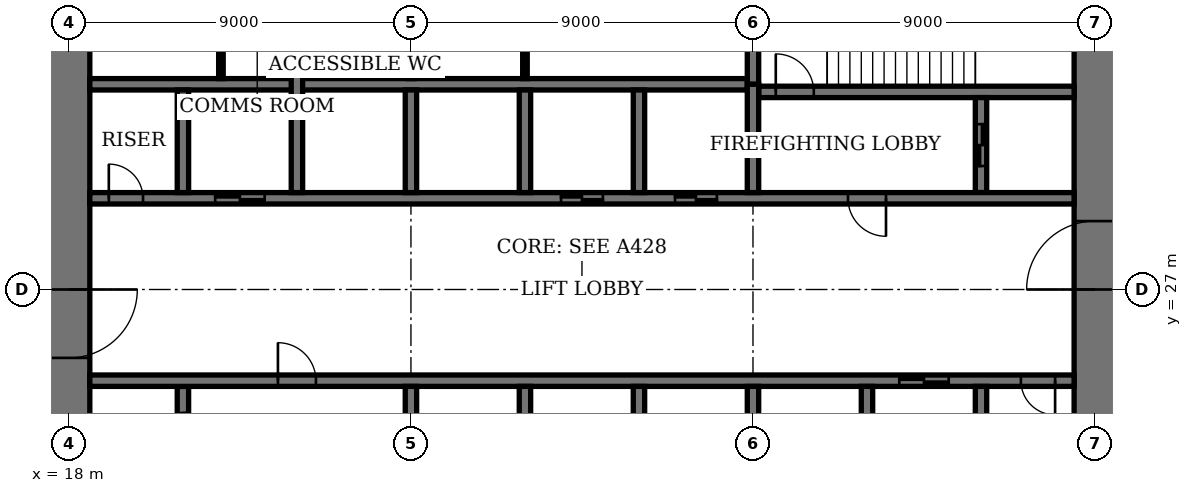
"""IFC4 building model, lengths in metres.
Left out: names, types, materials, properties, quantities, classifications, styles, units other than length and angle.
Written with IfcOpenShell. Run it as: python <this file> out.ifc"""

import sys

from ifc_helpers import new_model, si_unit, direction, frame, frame_2d, origin, place, context, subcontext, project, spatial, rectangle, extrude, element, fill, save


model = new_model("IFC4")
c1 = context("Model", 3, precision=1e-05, world=origin(), true_north=direction((0.0, 1.0)))
c2 = subcontext(c1, "Body", "Model", "MODEL_VIEW")
j1 = project(units=[si_unit("LENGTHUNIT", "METRE"), si_unit("PLANEANGLEUNIT", "RADIAN")], contexts=[c1])
p1 = place(None, origin())
s1 = spatial("IfcSite", under=j1, at=p1, CompositionType="ELEMENT")
p2 = place(p1, origin())
s2 = spatial("IfcBuilding", under=s1, at=p2, CompositionType="ELEMENT")
p3 = place(p2, frame((0.0, 0.0, 141.0)))
s3 = spatial("IfcBuildingStorey", under=s2, at=p3, CompositionType="ELEMENT", Elevation=141.0)
p4 = place(p3, frame((18.0, 35.45, 0.0), z_axis=(0.0, 0.0, 1.0), x_axis=(0.0, -1.0, 0.0)))
e1 = element("IfcWall", 1, at=p4, inside=s3, PredefinedType="SHEAR", context=c2, shape_type="SweptSolid", body=[
    extrude(rectangle(XDim=16.9, YDim=1.1, at=frame_2d((8.45, 0.0))), origin(), (0.0, 0.0, 1.0), 4.0),
])
p5 = place(p4, frame((8.45, 0.0, 0.0)))
e2 = element("IfcOpeningElement", 2, at=p5, cuts=e1, PredefinedType="OPENING", context=c2, shape_type="SweptSolid", body=[
    extrude(rectangle(XDim=1.8, YDim=2.4, at=frame_2d((0.9, 1.2))), frame((0.0, 0.56, 0.0), z_axis=(0.0, -1.0, 0.0), x_axis=(1.0, 0.0, 0.0)), (0.0, 0.0, 1.0), 1.12),
])
p6 = place(p3, frame((45.0, 18.55, 0.0), z_axis=(0.0, 0.0, 1.0), x_axis=(0.0, 1.0, 0.0)))
e3 = element("IfcWall", 3, at=p6, inside=s3, PredefinedType="SHEAR", context=c2, shape_type="SweptSolid", body=[
    extrude(rectangle(XDim=16.9, YDim=1.1, at=frame_2d((8.45, 0.0))), origin(), (0.0, 0.0, 1.0), 4.0),
])
p7 = place(p6, frame((8.45, 0.0, 0.0)))
e4 = element("IfcOpeningElement", 4, at=p7, cuts=e3, PredefinedType="OPENING", context=c2, shape_type="SweptSolid", body=[
    extrude(rectangle(XDim=1.8, YDim=2.4, at=frame_2d((0.9, 1.2))), frame((0.0, 0.56, 0.0), z_axis=(0.0, -1.0, 0.0), x_axis=(1.0, 0.0, 0.0)), (0.0, 0.0, 1.0), 1.12),
])
p8 = place(p3, frame((36.15, 32.2, 0.0), z_axis=(0.0, 0.0, 1.0), x_axis=(1.0, 0.0, 0.0)))
e5 = element("IfcWall", 5, at=p8, inside=s3, PredefinedType="SHEAR", context=c2, shape_type="SweptSolid", body=[
    extrude(rectangle(XDim=8.3, YDim=0.3, at=frame_2d((4.15, 0.0))), origin(), (0.0, 0.0, 1.0), 4.0),
])
p9 = place(p8, frame((0.45, 0.0, 0.0)))
e6 = element("IfcOpeningElement", 6, at=p9, cuts=e5, PredefinedType="OPENING", context=c2, shape_type="SweptSolid", body=[
    extrude(rectangle(XDim=1.0, YDim=2.4, at=frame_2d((0.5, 1.2))), frame((0.0, 0.16, 0.0), z_axis=(0.0, -1.0, 0.0), x_axis=(1.0, 0.0, 0.0)), (0.0, 0.0, 1.0), 0.32),
])
p10 = place(p3, frame((36.0, 32.4, 0.0), z_axis=(0.0, 0.0, 1.0), x_axis=(0.0, 1.0, 0.0)))
e7 = element("IfcWall", 7, at=p10, inside=s3, PredefinedType="SHEAR", context=c2, shape_type="SweptSolid", body=[
    extrude(rectangle(XDim=3.05, YDim=0.3, at=frame_2d((1.525, 0.0))), origin(), (0.0, 0.0, 1.0), 4.0),
])
p11 = place(p3, frame((21.0, 21.95, 0.0), z_axis=(0.0, 0.0, 1.0), x_axis=(0.0, 1.0, 0.0)))
e8 = element("IfcWall", 8, at=p11, inside=s3, PredefinedType="SHEAR", context=c2, shape_type="SweptSolid", body=[
    extrude(rectangle(XDim=2.5, YDim=0.3, at=frame_2d((1.25, 0.0))), origin(), (0.0, 0.0, 1.0), 4.0),
])
p12 = place(p11, frame((0.7, 0.0, 0.0)))
e9 = element("IfcOpeningElement", 9, at=p12, cuts=e8, PredefinedType="OPENING", context=c2, shape_type="SweptSolid", body=[
    extrude(rectangle(XDim=1.1, YDim=2.4, at=frame_2d((0.55, 1.2))), frame((0.0, 0.16, 0.0), z_axis=(0.0, -1.0, 0.0), x_axis=(1.0, 0.0, 0.0)), (0.0, 0.0, 1.0), 0.32),
])
p13 = place(p3, frame((42.0, 29.55, 0.0), z_axis=(0.0, 0.0, 1.0), x_axis=(0.0, 1.0, 0.0)))
e10 = element("IfcWall", 10, at=p13, inside=s3, PredefinedType="SHEAR", context=c2, shape_type="SweptSolid", body=[
    extrude(rectangle(XDim=2.5, YDim=0.3, at=frame_2d((1.25, 0.0))), origin(), (0.0, 0.0, 1.0), 4.0),
])
p14 = place(p13, frame((0.7, 0.0, 0.0)))
e11 = element("IfcOpeningElement", 11, at=p14, cuts=e10, PredefinedType="OPENING", context=c2, shape_type="SweptSolid", body=[
    extrude(rectangle(XDim=1.1, YDim=2.4, at=frame_2d((0.55, 1.2))), frame((0.0, 0.16, 0.0), z_axis=(0.0, -1.0, 0.0), x_axis=(1.0, 0.0, 0.0)), (0.0, 0.0, 1.0), 0.32),
])
p15 = place(p3, frame((18.55, 24.6, 0.0), z_axis=(0.0, 0.0, 1.0), x_axis=(1.0, 0.0, 0.0)))
e12 = element("IfcWall", 12, at=p15, inside=s3, PredefinedType="SHEAR", context=c2, shape_type="SweptSolid", body=[
    extrude(rectangle(XDim=25.9, YDim=0.3, at=frame_2d((12.95, 0.0))), origin(), (0.0, 0.0, 1.0), 4.0),
])
p16 = place(p15, frame((4.95, 0.0, 0.0)))
e13 = element("IfcOpeningElement", 13, at=p16, cuts=e12, PredefinedType="OPENING", context=c2, shape_type="SweptSolid", body=[
    extrude(rectangle(XDim=1.0, YDim=2.4, at=frame_2d((0.5, 1.2))), frame((0.0, 0.16, 0.0), z_axis=(0.0, -1.0, 0.0), x_axis=(1.0, 0.0, 0.0)), (0.0, 0.0, 1.0), 0.32),
])
p17 = place(p15, frame((24.5, 0.0, 0.0)))
e14 = element("IfcOpeningElement", 14, at=p17, cuts=e12, PredefinedType="OPENING", context=c2, shape_type="SweptSolid", body=[
    extrude(rectangle(XDim=0.9, YDim=2.1, at=frame_2d((0.45, 1.05))), frame((0.0, 0.16, 0.0), z_axis=(0.0, -1.0, 0.0), x_axis=(1.0, 0.0, 0.0)), (0.0, 0.0, 1.0), 0.32),
])
p18 = place(p15, frame((21.3, 0.0, 0.0)))
e15 = element("IfcOpeningElement", 15, at=p18, cuts=e12, PredefinedType="OPENING", context=c2, shape_type="SweptSolid", body=[
    extrude(rectangle(XDim=1.3, YDim=2.4, at=frame_2d((0.65, 1.2))), frame((0.0, 0.16, 0.0), z_axis=(0.0, -1.0, 0.0), x_axis=(1.0, 0.0, 0.0)), (0.0, 0.0, 1.0), 0.32),
])
p19 = place(p3, frame((18.55, 29.4, 0.0), z_axis=(0.0, 0.0, 1.0), x_axis=(1.0, 0.0, 0.0)))
e16 = element("IfcWall", 16, at=p19, inside=s3, PredefinedType="SHEAR", context=c2, shape_type="SweptSolid", body=[
    extrude(rectangle(XDim=25.9, YDim=0.3, at=frame_2d((12.95, 0.0))), origin(), (0.0, 0.0, 1.0), 4.0),
])
p20 = place(p19, frame((19.95, 0.0, 0.0)))
e17 = element("IfcOpeningElement", 17, at=p20, cuts=e16, PredefinedType="OPENING", context=c2, shape_type="SweptSolid", body=[
    extrude(rectangle(XDim=1.0, YDim=2.4, at=frame_2d((0.5, 1.2))), frame((0.0, 0.16, 0.0), z_axis=(0.0, -1.0, 0.0), x_axis=(1.0, 0.0, 0.0)), (0.0, 0.0, 1.0), 0.32),
])
p21 = place(p19, frame((0.5, 0.0, 0.0)))
e18 = element("IfcOpeningElement", 18, at=p21, cuts=e16, PredefinedType="OPENING", context=c2, shape_type="SweptSolid", body=[
    extrude(rectangle(XDim=0.9, YDim=2.1, at=frame_2d((0.45, 1.05))), frame((0.0, 0.16, 0.0), z_axis=(0.0, -1.0, 0.0), x_axis=(1.0, 0.0, 0.0)), (0.0, 0.0, 1.0), 0.32),
])
p22 = place(p19, frame((15.4, 0.0, 0.0)))
e19 = element("IfcOpeningElement", 19, at=p22, cuts=e16, PredefinedType="OPENING", context=c2, shape_type="SweptSolid", body=[
    extrude(rectangle(XDim=1.1, YDim=2.4, at=frame_2d((0.55, 1.2))), frame((0.0, 0.16, 0.0), z_axis=(0.0, -1.0, 0.0), x_axis=(1.0, 0.0, 0.0)), (0.0, 0.0, 1.0), 0.32),
])
p23 = place(p19, frame((12.4, 0.0, 0.0)))
e20 = element("IfcOpeningElement", 20, at=p23, cuts=e16, PredefinedType="OPENING", context=c2, shape_type="SweptSolid", body=[
    extrude(rectangle(XDim=1.1, YDim=2.4, at=frame_2d((0.55, 1.2))), frame((0.0, 0.16, 0.0), z_axis=(0.0, -1.0, 0.0), x_axis=(1.0, 0.0, 0.0)), (0.0, 0.0, 1.0), 0.32),
])
p24 = place(p19, frame((3.3, 0.0, 0.0)))
e21 = element("IfcOpeningElement", 21, at=p24, cuts=e16, PredefinedType="OPENING", context=c2, shape_type="SweptSolid", body=[
    extrude(rectangle(XDim=1.3, YDim=2.4, at=frame_2d((0.65, 1.2))), frame((0.0, 0.16, 0.0), z_axis=(0.0, -1.0, 0.0), x_axis=(1.0, 0.0, 0.0)), (0.0, 0.0, 1.0), 0.32),
])
p25 = place(p3, frame((18.55, 32.4, 0.0), z_axis=(0.0, 0.0, 1.0), x_axis=(1.0, 0.0, 0.0)))
e22 = element("IfcWall", 22, at=p25, inside=s3, PredefinedType="SHEAR", context=c2, shape_type="SweptSolid", body=[
    extrude(rectangle(XDim=17.3, YDim=0.3, at=frame_2d((8.65, 0.0))), origin(), (0.0, 0.0, 1.0), 4.0),
])
for number, where, z_axis, x_axis in (
    (23, (30.0, 21.75, 0.0), (0.0, 0.0, 1.0), (0.0, 1.0, 0.0)),
    (24, (33.0, 29.55, 0.0), (0.0, 0.0, 1.0), (0.0, 1.0, 0.0)),
    (25, (33.0, 21.75, 0.0), (0.0, 0.0, 1.0), (0.0, 1.0, 0.0)),
    (26, (30.0, 29.55, 0.0), (0.0, 0.0, 1.0), (0.0, 1.0, 0.0)),
    (27, (36.0, 21.75, 0.0), (0.0, 0.0, 1.0), (0.0, 1.0, 0.0)),
    (28, (27.0, 29.55, 0.0), (0.0, 0.0, 1.0), (0.0, 1.0, 0.0)),
):
    element("IfcWall", number, at=place(p3, frame(where, z_axis=z_axis, x_axis=x_axis)), inside=s3, PredefinedType="SHEAR", context=c2, shape_type="SweptSolid", body=[
        extrude(rectangle(XDim=2.7, YDim=0.3, at=frame_2d((1.35, 0.0))), origin(), (0.0, 0.0, 1.0), 4.0),
    ])
for number, where, z_axis, x_axis in (
    (29, (39.0, 18.55, 0.0), (0.0, 0.0, 1.0), (0.0, 1.0, 0.0)),
    (30, (24.0, 29.55, 0.0), (0.0, 0.0, 1.0), (0.0, 1.0, 0.0)),
):
    element("IfcWall", number, at=place(p3, frame(where, z_axis=z_axis, x_axis=x_axis)), inside=s3, PredefinedType="SHEAR", context=c2, shape_type="SweptSolid", body=[
        extrude(rectangle(XDim=5.9, YDim=0.3, at=frame_2d((2.95, 0.0))), origin(), (0.0, 0.0, 1.0), 4.0),
    ])
for number, where, z_axis, x_axis in (
    (31, (42.0, 21.75, 0.0), (0.0, 0.0, 1.0), (0.0, 1.0, 0.0)),
    (32, (21.0, 29.55, 0.0), (0.0, 0.0, 1.0), (0.0, 1.0, 0.0)),
):
    element("IfcWall", number, at=place(p3, frame(where, z_axis=z_axis, x_axis=x_axis)), inside=s3, PredefinedType="SHEAR", context=c2, shape_type="SweptSolid", body=[
        extrude(rectangle(XDim=2.7, YDim=0.3, at=frame_2d((1.35, 0.0))), origin(), (0.0, 0.0, 1.0), 4.0),
    ])
for number, where, z_axis, x_axis in (
    (33, (27.0, 21.6, 0.0), (0.0, 0.0, 1.0), (0.0, 1.0, 0.0)),
    (34, (36.0, 29.55, 0.0), (0.0, 0.0, 1.0), (0.0, 1.0, 0.0)),
):
    element("IfcWall", number, at=place(p3, frame(where, z_axis=z_axis, x_axis=x_axis)), inside=s3, PredefinedType="SHEAR", context=c2, shape_type="SweptSolid", body=[
        extrude(rectangle(XDim=2.85, YDim=0.3, at=frame_2d((1.425, 0.0))), origin(), (0.0, 0.0, 1.0), 4.0),
    ])
p26 = place(p3, frame((30.0, 32.55, 0.0), z_axis=(0.0, 0.0, 1.0), x_axis=(0.0, 1.0, 0.0)))
e35 = element("IfcWall", 35, at=p26, inside=s3, PredefinedType="PARTITIONING", context=c2, shape_type="SweptSolid", body=[
    extrude(rectangle(XDim=2.9, YDim=0.12, at=frame_2d((1.45, 0.0))), origin(), (0.0, 0.0, 1.0), 3.75),
])
p27 = place(p3, frame((27.0, 32.55, 0.0), z_axis=(0.0, 0.0, 1.0), x_axis=(0.0, 1.0, 0.0)))
e36 = element("IfcWall", 36, at=p27, inside=s3, PredefinedType="PARTITIONING", context=c2, shape_type="SweptSolid", body=[
    extrude(rectangle(XDim=2.9, YDim=0.15, at=frame_2d((1.45, 0.0))), origin(), (0.0, 0.0, 1.0), 3.75),
])
p28 = place(p3, frame((22.0, 32.55, 0.0), z_axis=(0.0, 0.0, 1.0), x_axis=(0.0, 1.0, 0.0)))
e37 = element("IfcWall", 37, at=p28, inside=s3, PredefinedType="PARTITIONING", context=c2, shape_type="SweptSolid", body=[
    extrude(rectangle(XDim=2.9, YDim=0.12, at=frame_2d((1.45, 0.0))), origin(), (0.0, 0.0, 1.0), 3.75),
])
p29 = place(p28, frame((0.95, 0.0, 0.0)))
e38 = element("IfcOpeningElement", 38, at=p29, cuts=e37, PredefinedType="OPENING", context=c2, shape_type="SweptSolid", body=[
    extrude(rectangle(XDim=1.0, YDim=2.4, at=frame_2d((0.5, 1.2))), frame((0.0, 0.07, 0.0), z_axis=(0.0, -1.0, 0.0), x_axis=(1.0, 0.0, 0.0)), (0.0, 0.0, 1.0), 0.14),
])
p30 = place(p5, origin())
e39 = element("IfcDoor", 39, at=p30, inside=s3, OperationType="DOUBLE_DOOR_DOUBLE_SWING", PredefinedType="DOOR", context=c2, shape_type="SweptSolid", body=[
    extrude(rectangle(XDim=1.8, YDim=2.4, at=frame_2d((0.9, 1.2))), frame((0.0, 0.03, 0.0), z_axis=(0.0, -1.0, 0.0), x_axis=(1.0, 0.0, 0.0)), (0.0, 0.0, 1.0), 0.06),
    extrude(rectangle(XDim=0.04, YDim=2.4, at=frame_2d((0.02, 1.2))), frame((0.0, 0.55, 0.0), z_axis=(0.0, -1.0, 0.0), x_axis=(1.0, 0.0, 0.0)), (0.0, 0.0, 1.0), 1.1),
    extrude(rectangle(XDim=0.04, YDim=2.4, at=frame_2d((1.78, 1.2))), frame((0.0, 0.55, 0.0), z_axis=(0.0, -1.0, 0.0), x_axis=(1.0, 0.0, 0.0)), (0.0, 0.0, 1.0), 1.1),
    extrude(rectangle(XDim=1.8, YDim=0.04, at=frame_2d((0.9, 2.38))), frame((0.0, 0.55, 0.0), z_axis=(0.0, -1.0, 0.0), x_axis=(1.0, 0.0, 0.0)), (0.0, 0.0, 1.0), 1.1),
])
fill(e2, e39)
p31 = place(p7, origin())
e40 = element("IfcDoor", 40, at=p31, inside=s3, OperationType="DOUBLE_DOOR_DOUBLE_SWING", PredefinedType="DOOR", context=c2, shape_type="SweptSolid", body=[
    extrude(rectangle(XDim=1.8, YDim=2.4, at=frame_2d((0.9, 1.2))), frame((0.0, 0.03, 0.0), z_axis=(0.0, -1.0, 0.0), x_axis=(1.0, 0.0, 0.0)), (0.0, 0.0, 1.0), 0.06),
    extrude(rectangle(XDim=0.04, YDim=2.4, at=frame_2d((0.02, 1.2))), frame((0.0, 0.55, 0.0), z_axis=(0.0, -1.0, 0.0), x_axis=(1.0, 0.0, 0.0)), (0.0, 0.0, 1.0), 1.1),
    extrude(rectangle(XDim=0.04, YDim=2.4, at=frame_2d((1.78, 1.2))), frame((0.0, 0.55, 0.0), z_axis=(0.0, -1.0, 0.0), x_axis=(1.0, 0.0, 0.0)), (0.0, 0.0, 1.0), 1.1),
    extrude(rectangle(XDim=1.8, YDim=0.04, at=frame_2d((0.9, 2.38))), frame((0.0, 0.55, 0.0), z_axis=(0.0, -1.0, 0.0), x_axis=(1.0, 0.0, 0.0)), (0.0, 0.0, 1.0), 1.1),
])
fill(e4, e40)
p32 = place(p9, origin())
e41 = element("IfcDoor", 41, at=p32, inside=s3, OperationType="SINGLE_SWING_RIGHT", PredefinedType="DOOR", context=c2, shape_type="SweptSolid", body=[
    extrude(rectangle(XDim=1.0, YDim=2.4, at=frame_2d((0.5, 1.2))), frame((0.0, 0.03, 0.0), z_axis=(0.0, -1.0, 0.0), x_axis=(1.0, 0.0, 0.0)), (0.0, 0.0, 1.0), 0.06),
])
fill(e6, e41)
p33 = place(p16, origin())
e42 = element("IfcDoor", 42, at=p33, inside=s3, OperationType="SINGLE_SWING_RIGHT", PredefinedType="DOOR", context=c2, shape_type="SweptSolid", body=[
    extrude(rectangle(XDim=1.0, YDim=2.4, at=frame_2d((0.5, 1.2))), frame((0.0, 0.03, 0.0), z_axis=(0.0, -1.0, 0.0), x_axis=(1.0, 0.0, 0.0)), (0.0, 0.0, 1.0), 0.06),
])
fill(e13, e42)
p34 = place(p20, origin())
e43 = element("IfcDoor", 43, at=p34, inside=s3, OperationType="SINGLE_SWING_RIGHT", PredefinedType="DOOR", context=c2, shape_type="SweptSolid", body=[
    extrude(rectangle(XDim=1.0, YDim=2.4, at=frame_2d((0.5, 1.2))), frame((0.0, 0.03, 0.0), z_axis=(0.0, -1.0, 0.0), x_axis=(1.0, 0.0, 0.0)), (0.0, 0.0, 1.0), 0.06),
])
fill(e17, e43)
p35 = place(p17, origin())
e44 = element("IfcDoor", 44, at=p35, inside=s3, OperationType="SINGLE_SWING_RIGHT", PredefinedType="DOOR", context=c2, shape_type="SweptSolid", body=[
    extrude(rectangle(XDim=0.9, YDim=2.1, at=frame_2d((0.45, 1.05))), frame((0.0, 0.03, 0.0), z_axis=(0.0, -1.0, 0.0), x_axis=(1.0, 0.0, 0.0)), (0.0, 0.0, 1.0), 0.06),
])
fill(e14, e44)
p36 = place(p21, origin())
e45 = element("IfcDoor", 45, at=p36, inside=s3, OperationType="SINGLE_SWING_RIGHT", PredefinedType="DOOR", context=c2, shape_type="SweptSolid", body=[
    extrude(rectangle(XDim=0.9, YDim=2.1, at=frame_2d((0.45, 1.05))), frame((0.0, 0.03, 0.0), z_axis=(0.0, -1.0, 0.0), x_axis=(1.0, 0.0, 0.0)), (0.0, 0.0, 1.0), 0.06),
])
fill(e18, e45)
p37 = place(p22, origin())
e46 = element("IfcDoor", 46, at=p37, inside=s3, OperationType="DOUBLE_DOOR_SLIDING", PredefinedType="DOOR", context=c2, shape_type="SweptSolid", body=[
    extrude(rectangle(XDim=1.1, YDim=2.4, at=frame_2d((0.55, 1.2))), frame((0.0, 0.02, 0.0), z_axis=(0.0, -1.0, 0.0), x_axis=(1.0, 0.0, 0.0)), (0.0, 0.0, 1.0), 0.04),
])
fill(e19, e46)
p38 = place(p23, origin())
e47 = element("IfcDoor", 47, at=p38, inside=s3, OperationType="DOUBLE_DOOR_SLIDING", PredefinedType="DOOR", context=c2, shape_type="SweptSolid", body=[
    extrude(rectangle(XDim=1.1, YDim=2.4, at=frame_2d((0.55, 1.2))), frame((0.0, 0.02, 0.0), z_axis=(0.0, -1.0, 0.0), x_axis=(1.0, 0.0, 0.0)), (0.0, 0.0, 1.0), 0.04),
])
fill(e20, e47)
p39 = place(p18, origin())
e48 = element("IfcDoor", 48, at=p39, inside=s3, OperationType="DOUBLE_DOOR_SLIDING", PredefinedType="DOOR", context=c2, shape_type="SweptSolid", body=[
    extrude(rectangle(XDim=1.3, YDim=2.4, at=frame_2d((0.65, 1.2))), frame((0.0, 0.02, 0.0), z_axis=(0.0, -1.0, 0.0), x_axis=(1.0, 0.0, 0.0)), (0.0, 0.0, 1.0), 0.04),
])
fill(e15, e48)
p40 = place(p24, origin())
e49 = element("IfcDoor", 49, at=p40, inside=s3, OperationType="DOUBLE_DOOR_SLIDING", PredefinedType="DOOR", context=c2, shape_type="SweptSolid", body=[
    extrude(rectangle(XDim=1.3, YDim=2.4, at=frame_2d((0.65, 1.2))), frame((0.0, 0.02, 0.0), z_axis=(0.0, -1.0, 0.0), x_axis=(1.0, 0.0, 0.0)), (0.0, 0.0, 1.0), 0.04),
])
fill(e21, e49)
p41 = place(p14, origin())
e50 = element("IfcDoor", 50, at=p41, inside=s3, OperationType="DOUBLE_DOOR_SLIDING", PredefinedType="DOOR", context=c2, shape_type="SweptSolid", body=[
    extrude(rectangle(XDim=1.1, YDim=2.4, at=frame_2d((0.55, 1.2))), frame((0.0, 0.03, 0.0), z_axis=(0.0, -1.0, 0.0), x_axis=(1.0, 0.0, 0.0)), (0.0, 0.0, 1.0), 0.06),
])
fill(e11, e50)
save(model, sys.argv[1])
